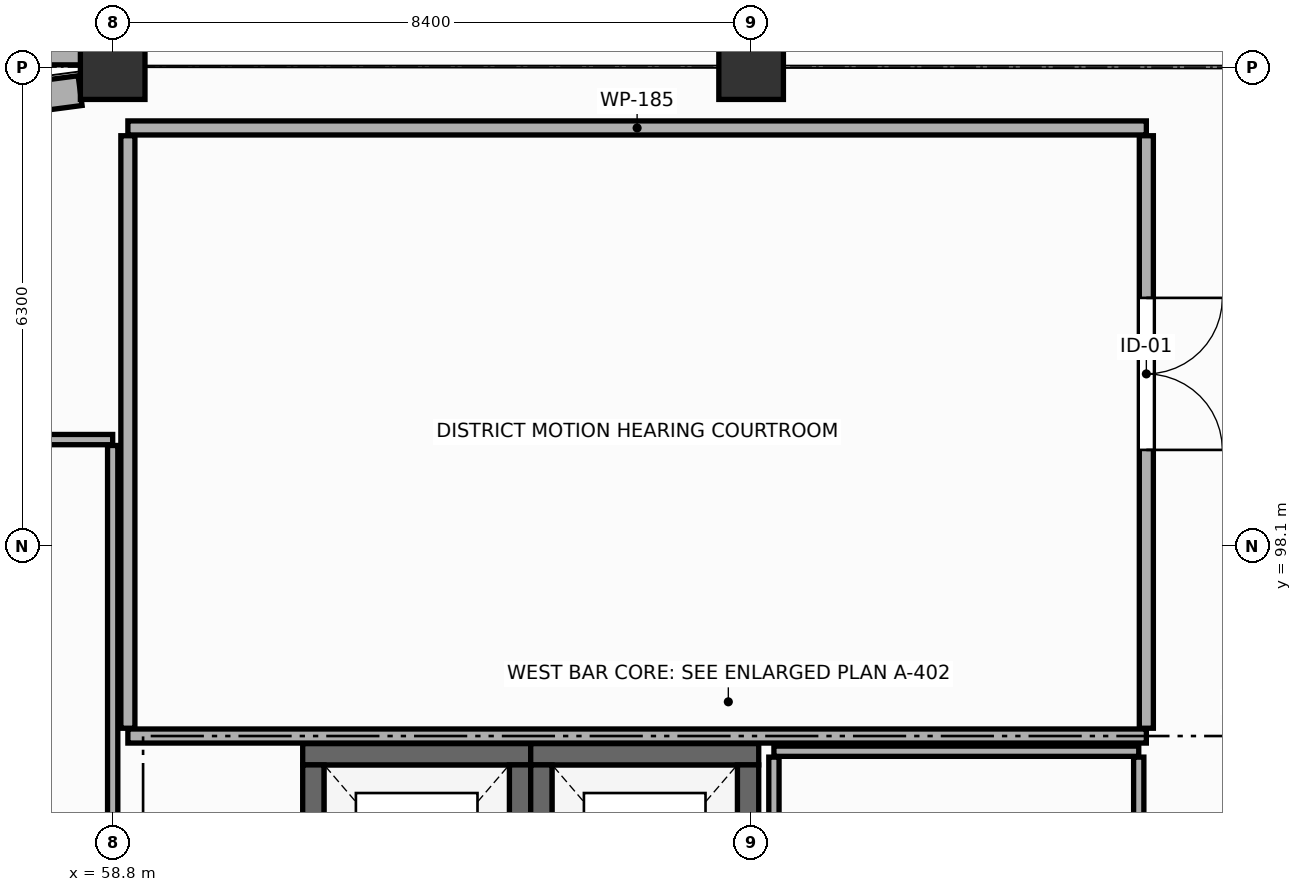
"""IFC4 building model, lengths in metres.
Left out: names, types, materials, properties, quantities, classifications, styles, units other than length and angle.
Written with IfcOpenShell. Run it as: python <this file> out.ifc"""

import sys

from ifc_helpers import new_model, si_unit, direction, frame, frame_2d, origin, origin_2d, place, context, subcontext, project, spatial, rectangle, extrude, element, fill, save


model = new_model("IFC4")
c1 = context("Model", 3, precision=1e-05, world=origin(), true_north=direction((0.0, 1.0)))
c2 = subcontext(c1, "Body", "Model", "MODEL_VIEW")
j1 = project(units=[si_unit("LENGTHUNIT", "METRE"), si_unit("PLANEANGLEUNIT", "RADIAN")], contexts=[c1])
p1 = place(None, origin())
s1 = spatial("IfcSite", under=j1, at=p1, CompositionType="ELEMENT")
p2 = place(p1, origin())
s2 = spatial("IfcBuilding", under=s1, at=p2, CompositionType="ELEMENT")
p3 = place(p2, frame((0.0, 0.0, 5.4)))
s3 = spatial("IfcBuildingStorey", under=s2, at=p3, CompositionType="ELEMENT", Elevation=5.4)
for number, where, z_axis, x_axis in (
    (1, (58.8, 104.4, 0.0), (0.0, 0.0, 1.0), (1.0, 0.0, 0.0)),
    (2, (67.2, 104.4, 0.0), (0.0, 0.0, 1.0), (1.0, 0.0, 0.0)),
):
    element("IfcColumn", number, at=place(p3, frame(where, z_axis=z_axis, x_axis=x_axis)), inside=s3, PredefinedType="COLUMN", context=c2, shape_type="SweptSolid", body=[
        extrude(rectangle(XDim=0.85, YDim=0.85, at=origin_2d()), origin(), (0.0, 0.0, 1.0), 4.5),
    ])
p4 = place(p3, frame((58.383, 104.65, 0.0), z_axis=(0.0, 0.0, 1.0), x_axis=(-1.0, 0.0, 0.0)))
e3 = element("IfcWall", 3, at=p4, inside=s3, PredefinedType="STANDARD", context=c2, shape_type="SweptSolid", body=[
    extrude(rectangle(XDim=11.683, YDim=0.44, at=frame_2d((5.842, 0.0))), origin(), (0.0, 0.0, 1.0), 3.32),
])
p5 = place(p4, frame((2.658, 0.0, 0.9)))
e4 = element("IfcOpeningElement", 4, at=p5, cuts=e3, PredefinedType="OPENING", context=c2, shape_type="SweptSolid", body=[
    extrude(rectangle(XDim=1.2, YDim=1.85, at=frame_2d((0.6, 0.925))), frame((0.0, 0.23, 0.0), z_axis=(0.0, -1.0, 0.0), x_axis=(1.0, 0.0, 0.0)), (0.0, 0.0, 1.0), 0.46),
])
p6 = place(p4, frame((7.908, 0.0, 0.9)))
e5 = element("IfcOpeningElement", 5, at=p6, cuts=e3, PredefinedType="OPENING", context=c2, shape_type="SweptSolid", body=[
    extrude(rectangle(XDim=1.2, YDim=1.85, at=frame_2d((0.6, 0.925))), frame((0.0, 0.23, 0.0), z_axis=(0.0, -1.0, 0.0), x_axis=(1.0, 0.0, 0.0)), (0.0, 0.0, 1.0), 0.46),
])
p7 = place(p3, frame((58.372, 104.091, 0.0), z_axis=(0.0, 0.0, 1.0), x_axis=(-0.991455178228, -0.130447803989, 0.0)))
e6 = element("IfcWall", 6, at=p7, inside=s3, PredefinedType="ELEMENTEDWALL", context=c2, shape_type="SweptSolid", body=[
    extrude(rectangle(XDim=2.824, YDim=0.395, at=frame_2d((1.412, 0.0))), origin(), (0.0, 0.0, 1.0), 3.37),
])
p8 = place(p7, frame((0.962, 0.0, 0.85)))
e7 = element("IfcOpeningElement", 7, at=p8, cuts=e6, PredefinedType="OPENING", context=c2, shape_type="SweptSolid", body=[
    extrude(rectangle(XDim=0.9, YDim=1.85, at=frame_2d((0.45, 0.925))), frame((0.0, 0.208, 0.0), z_axis=(0.0, -1.0, 0.0), x_axis=(1.0, 0.0, 0.0)), (0.0, 0.0, 1.0), 0.415),
])
p9 = place(p3, frame((61.3, 95.36, 0.0), z_axis=(0.0, 0.0, 1.0), x_axis=(1.0, 0.0, 0.0)))
e8 = element("IfcWall", 8, at=p9, inside=s3, PredefinedType="SHEAR", context=c2, shape_type="SweptSolid", body=[
    extrude(rectangle(XDim=3.0, YDim=0.28, at=frame_2d((1.5, 0.0))), origin(), (0.0, 0.0, 1.0), 4.24),
])
for number, where, z_axis, x_axis in (
    (9, (61.44, 92.38, 0.0), (0.0, 0.0, 1.0), (0.0, 1.0, 0.0)),
    (10, (64.16, 95.22, 0.0), (0.0, 0.0, 1.0), (0.0, -1.0, 0.0)),
):
    element("IfcWall", number, at=place(p3, frame(where, z_axis=z_axis, x_axis=x_axis)), inside=s3, PredefinedType="SHEAR", context=c2, shape_type="SweptSolid", body=[
        extrude(rectangle(XDim=2.84, YDim=0.28, at=frame_2d((1.42, 0.0))), origin(), (0.0, 0.0, 1.0), 4.24),
    ])
p10 = place(p3, frame((64.3, 95.36, 0.0), z_axis=(0.0, 0.0, 1.0), x_axis=(1.0, 0.0, 0.0)))
e11 = element("IfcWall", 11, at=p10, inside=s3, PredefinedType="SHEAR", context=c2, shape_type="SweptSolid", body=[
    extrude(rectangle(XDim=3.0, YDim=0.28, at=frame_2d((1.5, 0.0))), origin(), (0.0, 0.0, 1.0), 4.24),
])
for number, where, z_axis, x_axis in (
    (12, (64.44, 92.38, 0.0), (0.0, 0.0, 1.0), (0.0, 1.0, 0.0)),
    (13, (67.16, 95.22, 0.0), (0.0, 0.0, 1.0), (0.0, -1.0, 0.0)),
):
    element("IfcWall", number, at=place(p3, frame(where, z_axis=z_axis, x_axis=x_axis)), inside=s3, PredefinedType="SHEAR", context=c2, shape_type="SweptSolid", body=[
        extrude(rectangle(XDim=2.84, YDim=0.28, at=frame_2d((1.42, 0.0))), origin(), (0.0, 0.0, 1.0), 4.24),
    ])
for number, where, z_axis, x_axis in (
    (14, (59.0, 103.6, 0.0), (0.0, 0.0, 1.0), (1.0, 0.0, 0.0)),
    (15, (72.4, 95.6, 0.0), (0.0, 0.0, 1.0), (-1.0, 0.0, 0.0)),
):
    element("IfcWall", number, at=place(p3, frame(where, z_axis=z_axis, x_axis=x_axis)), inside=s3, PredefinedType="PARTITIONING", context=c2, shape_type="SweptSolid", body=[
        extrude(rectangle(XDim=13.4, YDim=0.185, at=frame_2d((6.7, 0.0))), origin(), (0.0, 0.0, 1.0), 3.37),
    ])
p11 = place(p3, frame((59.0, 95.702, 0.0), z_axis=(0.0, 0.0, 1.0), x_axis=(0.0, 1.0, 0.0)))
e16 = element("IfcWall", 16, at=p11, inside=s3, PredefinedType="PARTITIONING", context=c2, shape_type="SweptSolid", body=[
    extrude(rectangle(XDim=7.795, YDim=0.185, at=frame_2d((3.897, 0.0))), origin(), (0.0, 0.0, 1.0), 3.37),
])
p12 = place(p3, frame((72.4, 103.498, 0.0), z_axis=(0.0, 0.0, 1.0), x_axis=(0.0, -1.0, 0.0)))
e17 = element("IfcWall", 17, at=p12, inside=s3, PredefinedType="PARTITIONING", context=c2, shape_type="SweptSolid", body=[
    extrude(rectangle(XDim=7.795, YDim=0.185, at=frame_2d((3.897, 0.0))), origin(), (0.0, 0.0, 1.0), 3.62),
])
p13 = place(p12, frame((2.133, 0.0, 0.0)))
e18 = element("IfcOpeningElement", 18, at=p13, cuts=e17, PredefinedType="OPENING", context=c2, shape_type="SweptSolid", body=[
    extrude(rectangle(XDim=2.0, YDim=2.5, at=frame_2d((1.0, 1.25))), frame((0.0, 0.103, 0.0), z_axis=(0.0, -1.0, 0.0), x_axis=(1.0, 0.0, 0.0)), (0.0, 0.0, 1.0), 0.205),
])
p14 = place(p3, frame((67.5, 95.4, 0.0), z_axis=(0.0, 0.0, 1.0), x_axis=(1.0, 0.0, 0.0)))
e19 = element("IfcWall", 19, at=p14, inside=s3, PredefinedType="PARTITIONING", context=c2, shape_type="SweptSolid", body=[
    extrude(rectangle(XDim=4.8, YDim=0.135, at=frame_2d((2.4, 0.0))), origin(), (0.0, 0.0, 1.0), 3.37),
])
p15 = place(p3, frame((67.5, 92.028, 0.0), z_axis=(0.0, 0.0, 1.0), x_axis=(0.0, 1.0, 0.0)))
e20 = element("IfcWall", 20, at=p15, inside=s3, PredefinedType="PARTITIONING", context=c2, shape_type="SweptSolid", body=[
    extrude(rectangle(XDim=3.295, YDim=0.135, at=frame_2d((1.647, 0.0))), origin(), (0.0, 0.0, 1.0), 3.37),
])
p16 = place(p3, frame((72.3, 95.323, 0.0), z_axis=(0.0, 0.0, 1.0), x_axis=(0.0, -1.0, 0.0)))
e21 = element("IfcWall", 21, at=p16, inside=s3, PredefinedType="PARTITIONING", context=c2, shape_type="SweptSolid", body=[
    extrude(rectangle(XDim=3.295, YDim=0.135, at=frame_2d((1.647, 0.0))), origin(), (0.0, 0.0, 1.0), 3.57),
])
p17 = place(p3, frame((49.3, 99.5, 0.0), z_axis=(0.0, 0.0, 1.0), x_axis=(1.0, 0.0, 0.0)))
e22 = element("IfcWall", 22, at=p17, inside=s3, PredefinedType="PARTITIONING", context=c2, shape_type="SweptSolid", body=[
    extrude(rectangle(XDim=9.5, YDim=0.135, at=frame_2d((4.75, 0.0))), origin(), (0.0, 0.0, 1.0), 3.27),
])
p18 = place(p3, frame((58.8, 99.423, 0.0), z_axis=(0.0, 0.0, 1.0), x_axis=(0.0, -1.0, 0.0)))
e23 = element("IfcWall", 23, at=p18, inside=s3, PredefinedType="PARTITIONING", context=c2, shape_type="SweptSolid", body=[
    extrude(rectangle(XDim=7.395, YDim=0.135, at=frame_2d((3.698, 0.0))), origin(), (0.0, 0.0, 1.0), 3.37),
])
p19 = place(p13, origin())
e24 = element("IfcDoor", 24, at=p19, inside=s3, OperationType="DOUBLE_DOOR_SINGLE_SWING", PredefinedType="DOOR", context=c2, shape_type="SweptSolid", body=[
    extrude(rectangle(XDim=2.0, YDim=2.5, at=frame_2d((1.0, 1.25))), frame((0.0, 0.025, 0.0), z_axis=(0.0, -1.0, 0.0), x_axis=(1.0, 0.0, 0.0)), (0.0, 0.0, 1.0), 0.05),
])
fill(e18, e24)
save(model, sys.argv[1])
